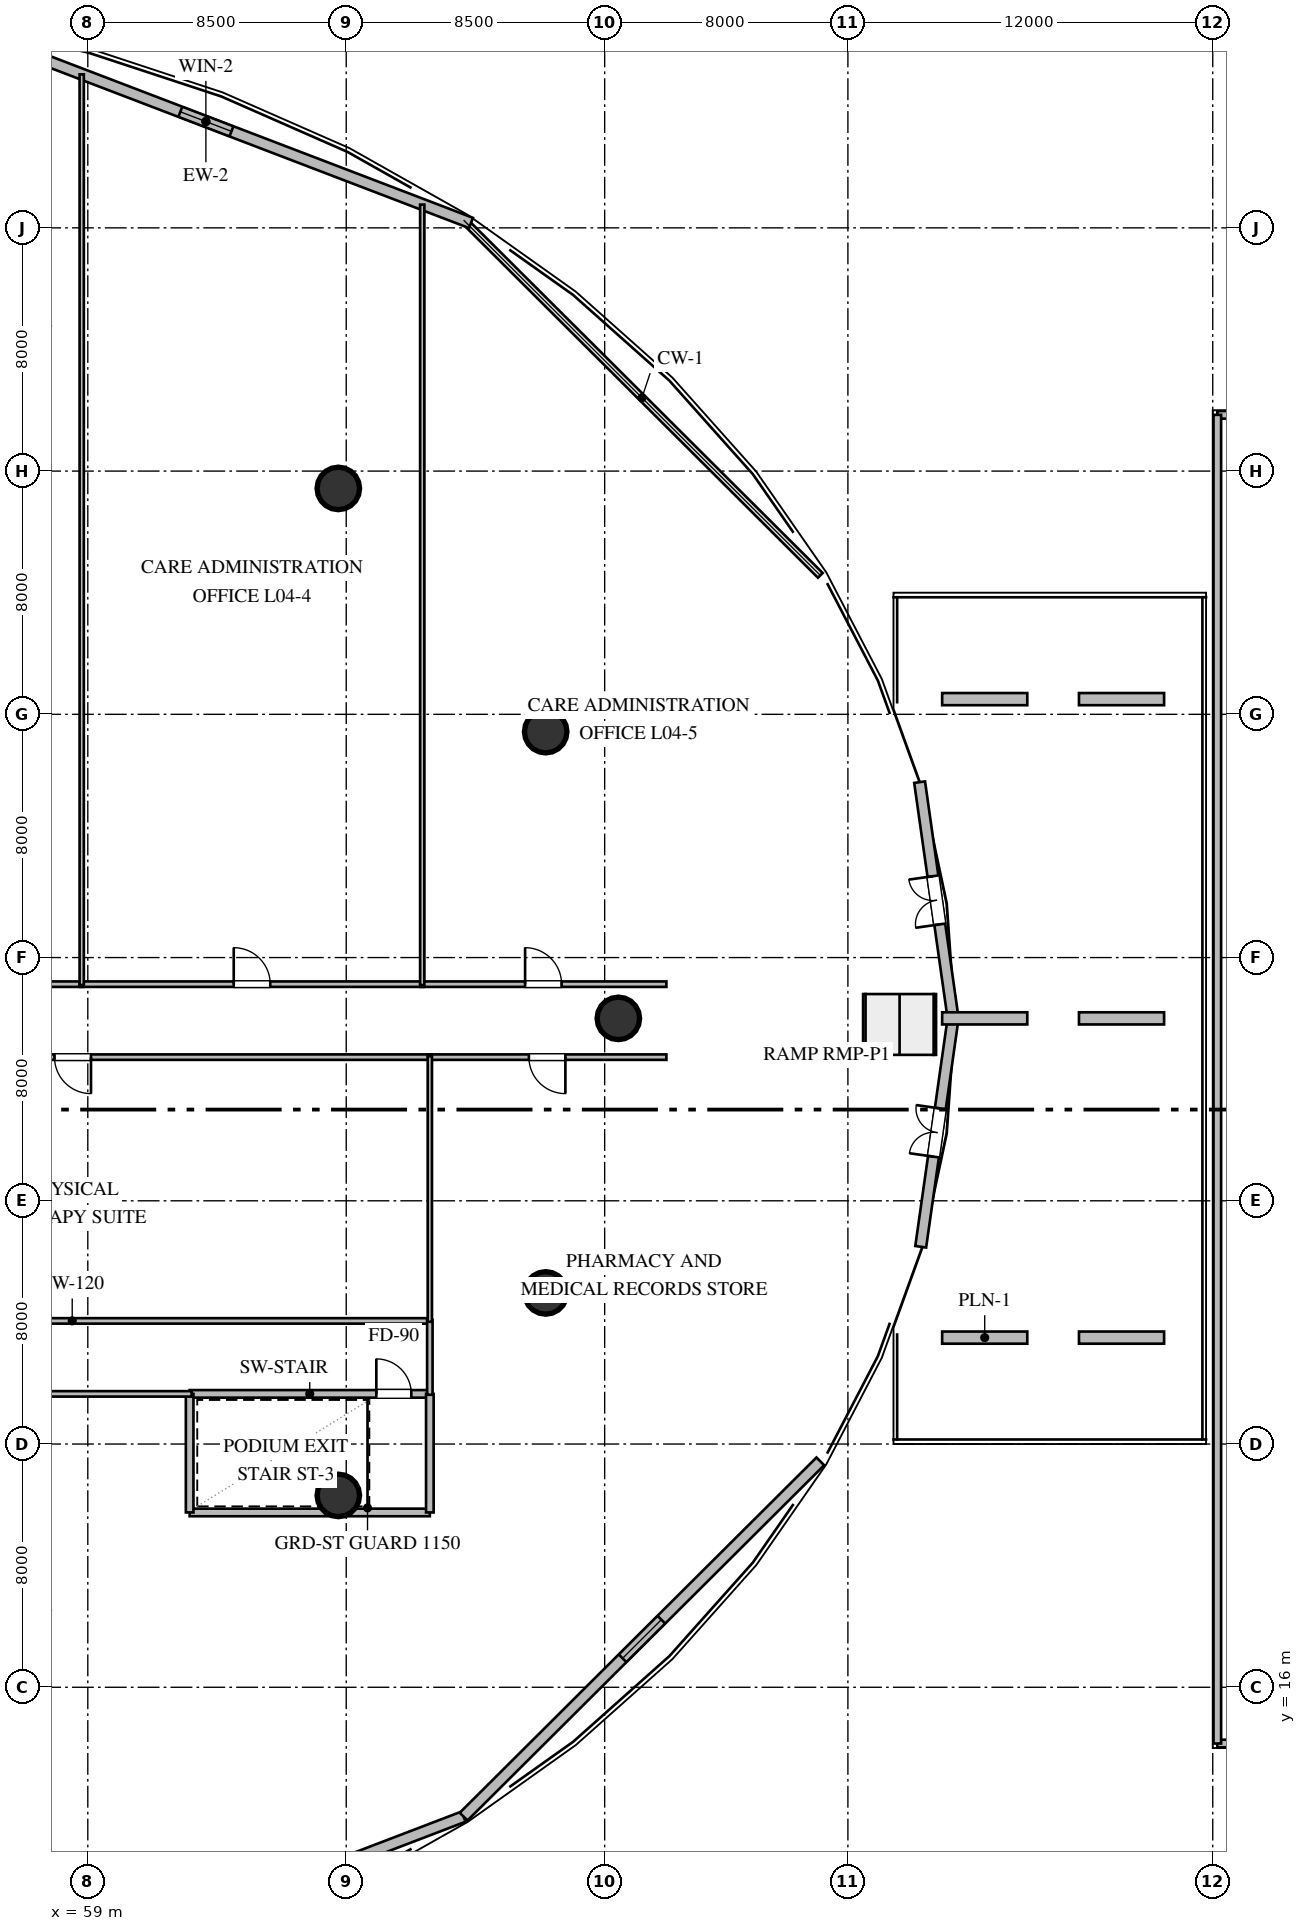
"""IFC4 building model, lengths in metres.
Left out: names, types, materials, properties, quantities, classifications, styles, units other than length and angle.
Written with IfcOpenShell. Run it as: python <this file> out.ifc"""

import sys

from ifc_helpers import new_model, si_unit, direction, frame, frame_2d, origin, origin_2d, place, context, subcontext, project, spatial, rectangle, circle, extrude, element, fill, save


model = new_model("IFC4")
c1 = context("Model", 3, precision=1e-05, world=origin(), true_north=direction((0.0, 1.0)))
c2 = subcontext(c1, "Body", "Model", "MODEL_VIEW")
j1 = project(units=[si_unit("LENGTHUNIT", "METRE"), si_unit("PLANEANGLEUNIT", "RADIAN")], contexts=[c1])
p1 = place(None, origin())
s1 = spatial("IfcSite", under=j1, at=p1, CompositionType="ELEMENT")
p2 = place(p1, origin())
s2 = spatial("IfcBuilding", under=s1, at=p2, CompositionType="ELEMENT")
p3 = place(p2, frame((0.0, 0.0, 19.2)))
s3 = spatial("IfcBuildingStorey", under=s2, at=p3, CompositionType="ELEMENT", Elevation=19.2)
for number, where, z_axis, x_axis in (
    (1, (76.45, 38.0, 0.0), (0.0, 0.0, 1.0), (1.0, 0.0, 0.0)),
    (2, (74.06, 47.43, 0.0), (0.0, 0.0, 1.0), (1.0, 0.0, 0.0)),
    (3, (67.24, 55.43, 0.0), (0.0, 0.0, 1.0), (1.0, 0.0, 0.0)),
    (4, (67.24, 22.31, 0.0), (0.0, 0.0, 1.0), (1.0, 0.0, 0.0)),
    (5, (74.06, 28.97, 0.0), (0.0, 0.0, 1.0), (1.0, 0.0, 0.0)),
):
    element("IfcColumn", number, at=place(p3, frame(where, z_axis=z_axis, x_axis=x_axis)), inside=s3, PredefinedType="COLUMN", context=c2, shape_type="SweptSolid", body=[
        extrude(circle(Radius=0.7, at=origin_2d()), origin(), (0.0, 0.0, 1.0), 4.8),
    ])
p4 = place(p3, frame((87.46, 38.0, 0.0), z_axis=(0.0, 0.0, 1.0), x_axis=(-0.140323571821, 0.990105699, 0.0)))
e6 = element("IfcWall", 6, at=p4, inside=s3, PredefinedType="STANDARD", context=c2, shape_type="SweptSolid", body=[
    extrude(rectangle(XDim=7.847, YDim=0.36, at=frame_2d((3.923, 0.0))), origin(), (0.0, 0.0, 1.0), 4.56),
])
p5 = place(p4, frame((3.123, 0.0, 0.0)))
e7 = element("IfcOpeningElement", 7, at=p5, cuts=e6, PredefinedType="OPENING", context=c2, shape_type="SweptSolid", body=[
    extrude(rectangle(XDim=1.6, YDim=2.2, at=frame_2d((0.8, 1.1))), frame((0.0, 0.19, 0.0), z_axis=(0.0, -1.0, 0.0), x_axis=(1.0, 0.0, 0.0)), (0.0, 0.0, 1.0), 0.38),
])
p6 = place(p3, frame((71.604, 64.161, 0.0), z_axis=(0.0, 0.0, 1.0), x_axis=(-0.934010262022, 0.357246176238, 0.0)))
e8 = element("IfcWall", 8, at=p6, inside=s3, PredefinedType="STANDARD", context=c2, shape_type="SweptSolid", body=[
    extrude(rectangle(XDim=18.671, YDim=0.36, at=frame_2d((9.335, 0.0))), origin(), (0.0, 0.0, 1.0), 4.56),
])
p7 = place(p6, frame((8.436, 0.0, 1.05)))
e9 = element("IfcOpeningElement", 9, at=p7, cuts=e8, PredefinedType="OPENING", context=c2, shape_type="SweptSolid", body=[
    extrude(rectangle(XDim=1.8, YDim=1.7, at=frame_2d((0.9, 0.85))), frame((0.0, 0.19, 0.0), z_axis=(0.0, -1.0, 0.0), x_axis=(1.0, 0.0, 0.0)), (0.0, 0.0, 1.0), 0.38),
])
p8 = place(p3, frame((54.408, 5.262, 0.0), z_axis=(0.0, 0.0, 1.0), x_axis=(0.934014086565, 0.357236176917, 0.0)))
e10 = element("IfcWall", 10, at=p8, inside=s3, PredefinedType="STANDARD", context=c2, shape_type="SweptSolid", body=[
    extrude(rectangle(XDim=18.151, YDim=0.36, at=frame_2d((9.075, 0.0))), origin(), (0.0, 0.0, 1.0), 4.56),
])
p9 = place(p8, frame((8.175, 0.0, 1.05)))
e11 = element("IfcOpeningElement", 11, at=p9, cuts=e10, PredefinedType="OPENING", context=c2, shape_type="SweptSolid", body=[
    extrude(rectangle(XDim=1.8, YDim=1.7, at=frame_2d((0.9, 0.85))), frame((0.0, 0.19, 0.0), z_axis=(0.0, -1.0, 0.0), x_axis=(1.0, 0.0, 0.0)), (0.0, 0.0, 1.0), 0.38),
])
p10 = place(p3, frame((71.361, 11.746, 0.0), z_axis=(0.0, 0.0, 1.0), x_axis=(0.708557675059, 0.705652904135, 0.0)))
e12 = element("IfcWall", 12, at=p10, inside=s3, PredefinedType="STANDARD", context=c2, shape_type="SweptSolid", body=[
    extrude(rectangle(XDim=16.557, YDim=0.36, at=frame_2d((8.279, 0.0))), origin(), (0.0, 0.0, 1.0), 4.56),
])
p11 = place(p10, frame((7.379, 0.0, 1.05)))
e13 = element("IfcOpeningElement", 13, at=p11, cuts=e12, PredefinedType="OPENING", context=c2, shape_type="SweptSolid", body=[
    extrude(rectangle(XDim=1.8, YDim=1.7, at=frame_2d((0.9, 0.85))), frame((0.0, 0.19, 0.0), z_axis=(0.0, -1.0, 0.0), x_axis=(1.0, 0.0, 0.0)), (0.0, 0.0, 1.0), 0.38),
])
p12 = place(p3, frame((86.395, 30.488, 0.0), z_axis=(0.0, 0.0, 1.0), x_axis=(0.140362602825, 0.990100166513, 0.0)))
e14 = element("IfcWall", 14, at=p12, inside=s3, PredefinedType="STANDARD", context=c2, shape_type="SweptSolid", body=[
    extrude(rectangle(XDim=7.587, YDim=0.36, at=frame_2d((3.793, 0.0))), origin(), (0.0, 0.0, 1.0), 4.56),
])
p13 = place(p12, frame((2.994, 0.0, 0.0)))
e15 = element("IfcOpeningElement", 15, at=p13, cuts=e14, PredefinedType="OPENING", context=c2, shape_type="SweptSolid", body=[
    extrude(rectangle(XDim=1.6, YDim=2.2, at=frame_2d((0.8, 1.1))), frame((0.0, 0.19, 0.0), z_axis=(0.0, -1.0, 0.0), x_axis=(1.0, 0.0, 0.0)), (0.0, 0.0, 1.0), 0.38),
])
for number, where, z_axis, x_axis in (
    (16, (87.1, 27.5, 0.0), (0.0, 0.0, 1.0), (1.0, 0.0, 0.0)),
    (17, (91.6, 27.5, 0.0), (0.0, 0.0, 1.0), (1.0, 0.0, 0.0)),
    (18, (87.1, 38.0, 0.0), (0.0, 0.0, 1.0), (1.0, 0.0, 0.0)),
    (19, (91.6, 38.0, 0.0), (0.0, 0.0, 1.0), (1.0, 0.0, 0.0)),
    (20, (87.1, 48.5, 0.0), (0.0, 0.0, 1.0), (1.0, 0.0, 0.0)),
    (21, (91.6, 48.5, 0.0), (0.0, 0.0, 1.0), (1.0, 0.0, 0.0)),
):
    element("IfcWall", number, at=place(p3, frame(where, z_axis=z_axis, x_axis=x_axis)), inside=s3, PredefinedType="USERDEFINED", context=c2, shape_type="SweptSolid", body=[
        extrude(rectangle(XDim=2.8, YDim=0.4, at=frame_2d((1.4, 0.0))), origin(), (0.0, 0.0, 1.0), 0.65),
    ])
for number, where, z_axis, x_axis in (
    (22, (96.15, 14.15, 1.3), (0.0, 0.0, 1.0), (1.0, 0.0, 0.0)),
    (23, (145.85, 57.85, 1.3), (0.0, 0.0, 1.0), (-1.0, 0.0, 0.0)),
):
    element("IfcWall", number, at=place(p3, frame(where, z_axis=z_axis, x_axis=x_axis)), inside=s3, PredefinedType="PARAPET", context=c2, shape_type="SweptSolid", body=[
        extrude(rectangle(XDim=49.7, YDim=0.25, at=frame_2d((24.85, 0.0))), origin(), (0.0, 0.0, 1.0), 1.2),
    ])
p14 = place(p3, frame((96.15, 57.85, 1.3), z_axis=(0.0, 0.0, 1.0), x_axis=(0.0, -1.0, 0.0)))
e24 = element("IfcWall", 24, at=p14, inside=s3, PredefinedType="PARAPET", context=c2, shape_type="SweptSolid", body=[
    extrude(rectangle(XDim=43.7, YDim=0.25, at=frame_2d((21.85, 0.0))), origin(), (0.0, 0.0, 1.0), 1.2),
])
p15 = place(p3, frame((62.35, 25.65, 0.0), z_axis=(0.0, 0.0, 1.0), x_axis=(1.0, 0.0, 0.0)))
e25 = element("IfcWall", 25, at=p15, inside=s3, PredefinedType="SOLIDWALL", context=c2, shape_type="SweptSolid", body=[
    extrude(rectangle(XDim=7.9, YDim=0.25, at=frame_2d((3.95, 0.0))), origin(), (0.0, 0.0, 1.0), 4.56),
])
p16 = place(p15, frame((6.14, 0.0, 0.0)))
e26 = element("IfcOpeningElement", 26, at=p16, cuts=e25, PredefinedType="OPENING", context=c2, shape_type="SweptSolid", body=[
    extrude(rectangle(XDim=1.15, YDim=2.1, at=frame_2d((0.575, 1.05))), frame((0.0, 0.135, 0.0), z_axis=(0.0, -1.0, 0.0), x_axis=(1.0, 0.0, 0.0)), (0.0, 0.0, 1.0), 0.27),
])
p17 = place(p3, frame((62.35, 21.75, 0.0), z_axis=(0.0, 0.0, 1.0), x_axis=(1.0, 0.0, 0.0)))
e27 = element("IfcWall", 27, at=p17, inside=s3, PredefinedType="SOLIDWALL", context=c2, shape_type="SweptSolid", body=[
    extrude(rectangle(XDim=7.9, YDim=0.25, at=frame_2d((3.95, 0.0))), origin(), (0.0, 0.0, 1.0), 4.006),
])
for number, where, z_axis, x_axis in (
    (28, (62.35, 21.75, 0.0), (0.0, 0.0, 1.0), (0.0, 1.0, 0.0)),
    (29, (70.25, 21.75, 0.0), (0.0, 0.0, 1.0), (0.0, 1.0, 0.0)),
):
    element("IfcWall", number, at=place(p3, frame(where, z_axis=z_axis, x_axis=x_axis)), inside=s3, PredefinedType="SOLIDWALL", context=c2, shape_type="SweptSolid", body=[
        extrude(rectangle(XDim=3.9, YDim=0.25, at=frame_2d((1.95, 0.0))), origin(), (0.0, 0.0, 1.0), 4.56),
    ])
p18 = place(p3, frame((45.935, 39.125, 0.0), z_axis=(0.0, 0.0, 1.0), x_axis=(1.0, 0.0, 0.0)))
e30 = element("IfcWall", 30, at=p18, inside=s3, PredefinedType="PARTITIONING", context=c2, shape_type="SweptSolid", body=[
    extrude(rectangle(XDim=12.93, YDim=0.18, at=frame_2d((6.465, 0.0))), origin(), (0.0, 0.0, 1.0), 4.56),
])
p19 = place(p18, frame((5.865, 0.0, 0.0)))
e31 = element("IfcOpeningElement", 31, at=p19, cuts=e30, PredefinedType="OPENING", context=c2, shape_type="SweptSolid", body=[
    extrude(rectangle(XDim=1.2, YDim=2.15, at=frame_2d((0.6, 1.075))), frame((0.0, 0.1, 0.0), z_axis=(0.0, -1.0, 0.0), x_axis=(1.0, 0.0, 0.0)), (0.0, 0.0, 1.0), 0.2),
])
p20 = place(p3, frame((58.735, 39.125, 0.0), z_axis=(0.0, 0.0, 1.0), x_axis=(1.0, 0.0, 0.0)))
e32 = element("IfcWall", 32, at=p20, inside=s3, PredefinedType="PARTITIONING", context=c2, shape_type="SweptSolid", body=[
    extrude(rectangle(XDim=11.33, YDim=0.18, at=frame_2d((5.665, 0.0))), origin(), (0.0, 0.0, 1.0), 4.56),
])
p21 = place(p20, frame((5.065, 0.0, 0.0)))
e33 = element("IfcOpeningElement", 33, at=p21, cuts=e32, PredefinedType="OPENING", context=c2, shape_type="SweptSolid", body=[
    extrude(rectangle(XDim=1.2, YDim=2.15, at=frame_2d((0.6, 1.075))), frame((0.0, 0.1, 0.0), z_axis=(0.0, -1.0, 0.0), x_axis=(1.0, 0.0, 0.0)), (0.0, 0.0, 1.0), 0.2),
])
p22 = place(p3, frame((69.935, 39.125, 0.0), z_axis=(0.0, 0.0, 1.0), x_axis=(1.0, 0.0, 0.0)))
e34 = element("IfcWall", 34, at=p22, inside=s3, PredefinedType="PARTITIONING", context=c2, shape_type="SweptSolid", body=[
    extrude(rectangle(XDim=8.095, YDim=0.18, at=frame_2d((4.047, 0.0))), origin(), (0.0, 0.0, 1.0), 4.56),
])
p23 = place(p22, frame((3.448, 0.0, 0.0)))
e35 = element("IfcOpeningElement", 35, at=p23, cuts=e34, PredefinedType="OPENING", context=c2, shape_type="SweptSolid", body=[
    extrude(rectangle(XDim=1.2, YDim=2.15, at=frame_2d((0.6, 1.075))), frame((0.0, 0.1, 0.0), z_axis=(0.0, -1.0, 0.0), x_axis=(1.0, 0.0, 0.0)), (0.0, 0.0, 1.0), 0.2),
])
p24 = place(p3, frame((62.415, 25.65, 0.0), z_axis=(0.0, 0.0, 1.0), x_axis=(-1.0, 0.0, 0.0)))
e36 = element("IfcWall", 36, at=p24, inside=s3, PredefinedType="PARTITIONING", context=c2, shape_type="SweptSolid", body=[
    extrude(rectangle(XDim=18.405, YDim=0.18, at=frame_2d((9.203, 0.0))), origin(), (0.0, 0.0, 1.0), 4.006),
])
p25 = place(p24, frame((8.46, 0.0, 0.0)))
e37 = element("IfcOpeningElement", 37, at=p25, cuts=e36, PredefinedType="OPENING", context=c2, shape_type="SweptSolid", body=[
    extrude(rectangle(XDim=1.2, YDim=2.15, at=frame_2d((0.6, 1.075))), frame((0.0, 0.1, 0.0), z_axis=(0.0, -1.0, 0.0), x_axis=(1.0, 0.0, 0.0)), (0.0, 0.0, 1.0), 0.2),
])
p26 = place(p3, frame((70.315, 36.725, 0.0), z_axis=(0.0, 0.0, 1.0), x_axis=(-1.0, 0.0, 0.0)))
e38 = element("IfcWall", 38, at=p26, inside=s3, PredefinedType="PARTITIONING", context=c2, shape_type="SweptSolid", body=[
    extrude(rectangle(XDim=23.62, YDim=0.18, at=frame_2d((11.81, 0.0))), origin(), (0.0, 0.0, 1.0), 4.006),
])
p27 = place(p26, frame((11.21, 0.0, 0.0)))
e39 = element("IfcOpeningElement", 39, at=p27, cuts=e38, PredefinedType="OPENING", context=c2, shape_type="SweptSolid", body=[
    extrude(rectangle(XDim=1.2, YDim=2.15, at=frame_2d((0.6, 1.075))), frame((0.0, 0.1, 0.0), z_axis=(0.0, -1.0, 0.0), x_axis=(1.0, 0.0, 0.0)), (0.0, 0.0, 1.0), 0.2),
])
p28 = place(p3, frame((46.695, 28.05, 0.0), z_axis=(0.0, 0.0, 1.0), x_axis=(1.0, 0.0, 0.0)))
e40 = element("IfcWall", 40, at=p28, inside=s3, PredefinedType="PARTITIONING", context=c2, shape_type="SweptSolid", body=[
    extrude(rectangle(XDim=23.585, YDim=0.18, at=frame_2d((11.792, 0.0))), origin(), (0.0, 0.0, 1.0), 4.006),
])
p29 = place(p3, frame((78.03, 36.725, 0.0), z_axis=(0.0, 0.0, 1.0), x_axis=(-1.0, 0.0, 0.0)))
e41 = element("IfcWall", 41, at=p29, inside=s3, PredefinedType="PARTITIONING", context=c2, shape_type="SweptSolid", body=[
    extrude(rectangle(XDim=7.845, YDim=0.18, at=frame_2d((3.922, 0.0))), origin(), (0.0, 0.0, 1.0), 4.56),
])
p30 = place(p29, frame((3.322, 0.0, 0.0)))
e42 = element("IfcOpeningElement", 42, at=p30, cuts=e41, PredefinedType="OPENING", context=c2, shape_type="SweptSolid", body=[
    extrude(rectangle(XDim=1.2, YDim=2.15, at=frame_2d((0.6, 1.075))), frame((0.0, 0.1, 0.0), z_axis=(0.0, -1.0, 0.0), x_axis=(1.0, 0.0, 0.0)), (0.0, 0.0, 1.0), 0.2),
])
p31 = place(p3, frame((70.25, 28.08, 0.0), z_axis=(0.0, 0.0, 1.0), x_axis=(0.0, -1.0, 0.0)))
e43 = element("IfcWall", 43, at=p31, inside=s3, PredefinedType="PARTITIONING", context=c2, shape_type="SweptSolid", body=[
    extrude(rectangle(XDim=2.46, YDim=0.18, at=frame_2d((1.23, 0.0))), origin(), (0.0, 0.0, 1.0), 4.56),
])
p32 = place(p3, frame((58.8, 69.048, 0.0), z_axis=(0.0, 0.0, 1.0), x_axis=(0.0, -1.0, 0.0)))
e44 = element("IfcWall", 44, at=p32, inside=s3, PredefinedType="PARTITIONING", context=c2, shape_type="SweptSolid", body=[
    extrude(rectangle(XDim=29.953, YDim=0.14, at=frame_2d((14.977, 0.0))), origin(), (0.0, 0.0, 1.0), 4.56),
])
p33 = place(p3, frame((70.0, 64.764, 0.0), z_axis=(0.0, 0.0, 1.0), x_axis=(0.0, -1.0, 0.0)))
e45 = element("IfcWall", 45, at=p33, inside=s3, PredefinedType="PARTITIONING", context=c2, shape_type="SweptSolid", body=[
    extrude(rectangle(XDim=25.669, YDim=0.14, at=frame_2d((12.835, 0.0))), origin(), (0.0, 0.0, 1.0), 4.56),
])
p34 = place(p3, frame((70.25, 36.755, 0.0), z_axis=(0.0, 0.0, 1.0), x_axis=(0.0, -1.0, 0.0)))
e46 = element("IfcWall", 46, at=p34, inside=s3, PredefinedType="PARTITIONING", context=c2, shape_type="SweptSolid", body=[
    extrude(rectangle(XDim=8.735, YDim=0.14, at=frame_2d((4.367, 0.0))), origin(), (0.0, 0.0, 1.0), 4.56),
])
p35 = place(p5, origin())
e47 = element("IfcDoor", 47, at=p35, inside=s3, OperationType="DOUBLE_DOOR_SINGLE_SWING", PredefinedType="DOOR", context=c2, shape_type="SweptSolid", body=[
    extrude(rectangle(XDim=1.6, YDim=2.2, at=frame_2d((0.8, 1.1))), frame((0.0, 0.025, 0.0), z_axis=(0.0, -1.0, 0.0), x_axis=(1.0, 0.0, 0.0)), (0.0, 0.0, 1.0), 0.05),
])
fill(e7, e47)
p36 = place(p7, origin())
e48 = element("IfcWindow", 48, at=p36, inside=s3, PartitioningType="SINGLE_PANEL", PredefinedType="WINDOW", context=c2, shape_type="SweptSolid", body=[
    extrude(rectangle(XDim=1.8, YDim=1.7, at=frame_2d((0.9, 0.85))), frame((0.0, 0.03, 0.0), z_axis=(0.0, -1.0, 0.0), x_axis=(1.0, 0.0, 0.0)), (0.0, 0.0, 1.0), 0.06),
])
fill(e9, e48)
p37 = place(p11, origin())
e49 = element("IfcWindow", 49, at=p37, inside=s3, PartitioningType="SINGLE_PANEL", PredefinedType="WINDOW", context=c2, shape_type="SweptSolid", body=[
    extrude(rectangle(XDim=1.8, YDim=1.7, at=frame_2d((0.9, 0.85))), frame((0.0, 0.03, 0.0), z_axis=(0.0, -1.0, 0.0), x_axis=(1.0, 0.0, 0.0)), (0.0, 0.0, 1.0), 0.06),
])
fill(e13, e49)
p38 = place(p13, origin())
e50 = element("IfcDoor", 50, at=p38, inside=s3, OperationType="DOUBLE_DOOR_SINGLE_SWING", PredefinedType="DOOR", context=c2, shape_type="SweptSolid", body=[
    extrude(rectangle(XDim=1.6, YDim=2.2, at=frame_2d((0.8, 1.1))), frame((0.0, 0.025, 0.0), z_axis=(0.0, -1.0, 0.0), x_axis=(1.0, 0.0, 0.0)), (0.0, 0.0, 1.0), 0.05),
])
fill(e15, e50)
p39 = place(p16, origin())
e51 = element("IfcDoor", 51, at=p39, inside=s3, OperationType="SINGLE_SWING_LEFT", PredefinedType="DOOR", context=c2, shape_type="SweptSolid", body=[
    extrude(rectangle(XDim=1.15, YDim=2.1, at=frame_2d((0.575, 1.05))), frame((0.0, 0.025, 0.0), z_axis=(0.0, -1.0, 0.0), x_axis=(1.0, 0.0, 0.0)), (0.0, 0.0, 1.0), 0.05),
])
fill(e26, e51)
p40 = place(p21, origin())
e52 = element("IfcDoor", 52, at=p40, inside=s3, OperationType="SINGLE_SWING_LEFT", PredefinedType="DOOR", context=c2, shape_type="SweptSolid", body=[
    extrude(rectangle(XDim=1.2, YDim=2.15, at=frame_2d((0.6, 1.075))), frame((0.0, 0.025, 0.0), z_axis=(0.0, -1.0, 0.0), x_axis=(1.0, 0.0, 0.0)), (0.0, 0.0, 1.0), 0.05),
])
fill(e33, e52)
p41 = place(p23, origin())
e53 = element("IfcDoor", 53, at=p41, inside=s3, OperationType="SINGLE_SWING_LEFT", PredefinedType="DOOR", context=c2, shape_type="SweptSolid", body=[
    extrude(rectangle(XDim=1.2, YDim=2.15, at=frame_2d((0.6, 1.075))), frame((0.0, 0.025, 0.0), z_axis=(0.0, -1.0, 0.0), x_axis=(1.0, 0.0, 0.0)), (0.0, 0.0, 1.0), 0.05),
])
fill(e35, e53)
p42 = place(p27, origin())
e54 = element("IfcDoor", 54, at=p42, inside=s3, OperationType="SINGLE_SWING_LEFT", PredefinedType="DOOR", context=c2, shape_type="SweptSolid", body=[
    extrude(rectangle(XDim=1.2, YDim=2.15, at=frame_2d((0.6, 1.075))), frame((0.0, 0.025, 0.0), z_axis=(0.0, -1.0, 0.0), x_axis=(1.0, 0.0, 0.0)), (0.0, 0.0, 1.0), 0.05),
])
fill(e39, e54)
p43 = place(p30, origin())
e55 = element("IfcDoor", 55, at=p43, inside=s3, OperationType="SINGLE_SWING_LEFT", PredefinedType="DOOR", context=c2, shape_type="SweptSolid", body=[
    extrude(rectangle(XDim=1.2, YDim=2.15, at=frame_2d((0.6, 1.075))), frame((0.0, 0.025, 0.0), z_axis=(0.0, -1.0, 0.0), x_axis=(1.0, 0.0, 0.0)), (0.0, 0.0, 1.0), 0.05),
])
fill(e42, e55)
save(model, sys.argv[1])
